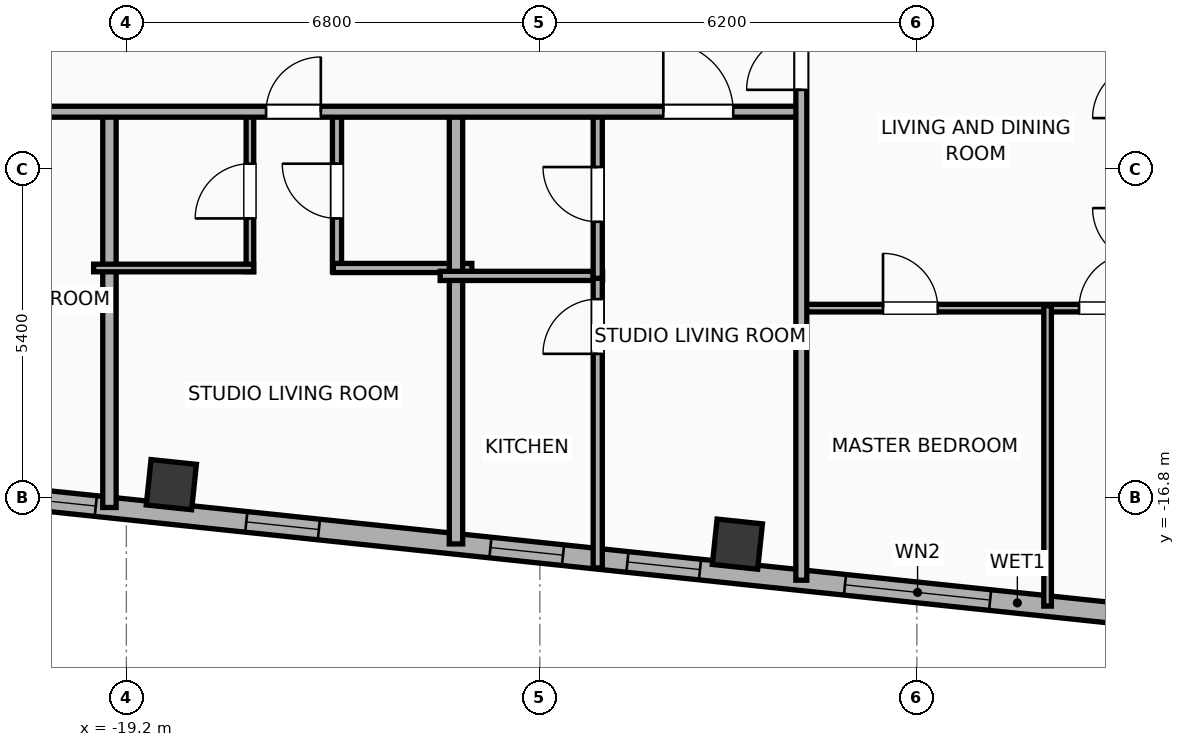
"""IFC4 building model, lengths in metres.
Left out: names, types, materials, properties, quantities, classifications, styles, units other than length and angle.
Written with IfcOpenShell. Run it as: python <this file> out.ifc"""

import sys

from ifc_helpers import new_model, si_unit, direction, frame, frame_2d, origin, origin_2d, place, context, subcontext, project, spatial, rectangle, hollow_rectangle, extrude, element, fill, save


model = new_model("IFC4")
c1 = context("Model", 3, precision=1e-05, world=origin(), true_north=direction((0.0, 1.0)))
c2 = subcontext(c1, "Body", "Model", "MODEL_VIEW")
j1 = project(units=[si_unit("LENGTHUNIT", "METRE"), si_unit("PLANEANGLEUNIT", "RADIAN")], contexts=[c1])
p1 = place(None, origin())
s1 = spatial("IfcSite", under=j1, at=p1, CompositionType="ELEMENT")
p2 = place(p1, origin())
s2 = spatial("IfcBuilding", under=s1, at=p2, CompositionType="ELEMENT")
p3 = place(p2, frame((0.0, 0.0, 263.9)))
s3 = spatial("IfcBuildingStorey", under=s2, at=p3, CompositionType="ELEMENT", Elevation=263.9)
for number, where, z_axis, x_axis in (
    (1, (-18.46, -16.583, 0.0), (0.0, 0.0, 1.0), (0.995, -0.105, 0.0)),
    (2, (-9.152, -17.561, 0.0), (0.0, 0.0, 1.0), (0.995, -0.105, 0.0)),
):
    element("IfcColumn", number, at=place(p3, frame(where, z_axis=z_axis, x_axis=x_axis)), inside=s3, PredefinedType="COLUMN", context=c2, shape_type="SweptSolid", body=[
        extrude(hollow_rectangle(XDim=0.75, YDim=0.75, WallThickness=0.025, at=origin_2d()), origin(), (0.0, 0.0, 1.0), 3.9),
    ])
p4 = place(p3, frame((18.708, -20.972, 0.0), z_axis=(0.0, 0.0, 1.0), x_axis=(-0.994521888554, 0.104528528102, 0.0)))
e3 = element("IfcWall", 3, at=p4, inside=s3, PredefinedType="ELEMENTEDWALL", context=c2, shape_type="SweptSolid", body=[
    extrude(rectangle(XDim=46.766, YDim=0.34, at=frame_2d((23.383, 0.0))), origin(), (0.0, 0.0, 1.0), 3.65),
])
p5 = place(p4, frame((23.833, 0.0, 0.75)))
e4 = element("IfcOpeningElement", 4, at=p5, cuts=e3, PredefinedType="OPENING", context=c2, shape_type="SweptSolid", body=[
    extrude(rectangle(XDim=2.4, YDim=2.1, at=frame_2d((1.2, 1.05))), frame((0.0, 0.18, 0.0), z_axis=(0.0, -1.0, 0.0), x_axis=(1.0, 0.0, 0.0)), (0.0, 0.0, 1.0), 0.36),
])
p6 = place(p4, frame((38.622, 0.0, 0.75)))
e5 = element("IfcOpeningElement", 5, at=p6, cuts=e3, PredefinedType="OPENING", context=c2, shape_type="SweptSolid", body=[
    extrude(rectangle(XDim=2.4, YDim=2.1, at=frame_2d((1.2, 1.05))), frame((0.0, 0.18, 0.0), z_axis=(0.0, -1.0, 0.0), x_axis=(1.0, 0.0, 0.0)), (0.0, 0.0, 1.0), 0.36),
])
p7 = place(p4, frame((44.402, 0.0, 0.75)))
e6 = element("IfcOpeningElement", 6, at=p7, cuts=e3, PredefinedType="OPENING", context=c2, shape_type="SweptSolid", body=[
    extrude(rectangle(XDim=1.2, YDim=2.05, at=frame_2d((0.6, 1.025))), frame((0.0, 0.18, 0.0), z_axis=(0.0, -1.0, 0.0), x_axis=(1.0, 0.0, 0.0)), (0.0, 0.0, 1.0), 0.36),
])
p8 = place(p4, frame((42.406, 0.0, 0.75)))
e7 = element("IfcOpeningElement", 7, at=p8, cuts=e3, PredefinedType="OPENING", context=c2, shape_type="SweptSolid", body=[
    extrude(rectangle(XDim=1.2, YDim=2.05, at=frame_2d((0.6, 1.025))), frame((0.0, 0.18, 0.0), z_axis=(0.0, -1.0, 0.0), x_axis=(1.0, 0.0, 0.0)), (0.0, 0.0, 1.0), 0.36),
])
p9 = place(p4, frame((34.933, 0.0, 0.75)))
e8 = element("IfcOpeningElement", 8, at=p9, cuts=e3, PredefinedType="OPENING", context=c2, shape_type="SweptSolid", body=[
    extrude(rectangle(XDim=1.2, YDim=2.05, at=frame_2d((0.6, 1.025))), frame((0.0, 0.18, 0.0), z_axis=(0.0, -1.0, 0.0), x_axis=(1.0, 0.0, 0.0)), (0.0, 0.0, 1.0), 0.36),
])
p10 = place(p4, frame((28.631, 0.0, 0.75)))
e9 = element("IfcOpeningElement", 9, at=p10, cuts=e3, PredefinedType="OPENING", context=c2, shape_type="SweptSolid", body=[
    extrude(rectangle(XDim=1.2, YDim=2.05, at=frame_2d((0.6, 1.025))), frame((0.0, 0.18, 0.0), z_axis=(0.0, -1.0, 0.0), x_axis=(1.0, 0.0, 0.0)), (0.0, 0.0, 1.0), 0.36),
])
p11 = place(p4, frame((30.896, 0.0, 0.75)))
e10 = element("IfcOpeningElement", 10, at=p11, cuts=e3, PredefinedType="OPENING", context=c2, shape_type="SweptSolid", body=[
    extrude(rectangle(XDim=1.2, YDim=2.05, at=frame_2d((0.6, 1.025))), frame((0.0, 0.18, 0.0), z_axis=(0.0, -1.0, 0.0), x_axis=(1.0, 0.0, 0.0)), (0.0, 0.0, 1.0), 0.36),
])
p12 = place(p4, frame((7.501, 0.0, 0.75)))
e11 = element("IfcOpeningElement", 11, at=p12, cuts=e3, PredefinedType="OPENING", context=c2, shape_type="SweptSolid", body=[
    extrude(rectangle(XDim=1.2, YDim=2.05, at=frame_2d((0.6, 1.025))), frame((0.0, 0.18, 0.0), z_axis=(0.0, -1.0, 0.0), x_axis=(1.0, 0.0, 0.0)), (0.0, 0.0, 1.0), 0.36),
])
p13 = place(p4, frame((4.159, 0.0, 0.75)))
e12 = element("IfcOpeningElement", 12, at=p13, cuts=e3, PredefinedType="OPENING", context=c2, shape_type="SweptSolid", body=[
    extrude(rectangle(XDim=1.2, YDim=2.05, at=frame_2d((0.6, 1.025))), frame((0.0, 0.18, 0.0), z_axis=(0.0, -1.0, 0.0), x_axis=(1.0, 0.0, 0.0)), (0.0, 0.0, 1.0), 0.36),
])
p14 = place(p4, frame((1.369, 0.0, 0.75)))
e13 = element("IfcOpeningElement", 13, at=p14, cuts=e3, PredefinedType="OPENING", context=c2, shape_type="SweptSolid", body=[
    extrude(rectangle(XDim=1.2, YDim=2.05, at=frame_2d((0.6, 1.025))), frame((0.0, 0.18, 0.0), z_axis=(0.0, -1.0, 0.0), x_axis=(1.0, 0.0, 0.0)), (0.0, 0.0, 1.0), 0.36),
])
p15 = place(p4, frame((20.254, 0.0, 0.75)))
e14 = element("IfcOpeningElement", 14, at=p15, cuts=e3, PredefinedType="OPENING", context=c2, shape_type="SweptSolid", body=[
    extrude(rectangle(XDim=1.2, YDim=2.05, at=frame_2d((0.6, 1.025))), frame((0.0, 0.18, 0.0), z_axis=(0.0, -1.0, 0.0), x_axis=(1.0, 0.0, 0.0)), (0.0, 0.0, 1.0), 0.36),
])
p16 = place(p4, frame((16.172, 0.0, 0.75)))
e15 = element("IfcOpeningElement", 15, at=p16, cuts=e3, PredefinedType="OPENING", context=c2, shape_type="SweptSolid", body=[
    extrude(rectangle(XDim=1.2, YDim=2.05, at=frame_2d((0.6, 1.025))), frame((0.0, 0.18, 0.0), z_axis=(0.0, -1.0, 0.0), x_axis=(1.0, 0.0, 0.0)), (0.0, 0.0, 1.0), 0.36),
])
p17 = place(p4, frame((12.11, 0.0, 0.75)))
e16 = element("IfcOpeningElement", 16, at=p17, cuts=e3, PredefinedType="OPENING", context=c2, shape_type="SweptSolid", body=[
    extrude(rectangle(XDim=1.2, YDim=2.05, at=frame_2d((0.6, 1.025))), frame((0.0, 0.18, 0.0), z_axis=(0.0, -1.0, 0.0), x_axis=(1.0, 0.0, 0.0)), (0.0, 0.0, 1.0), 0.36),
])
p18 = place(p3, frame((-19.478, -16.959, 0.0), z_axis=(0.0, 0.0, 1.0), x_axis=(0.0, 1.0, 0.0)))
e17 = element("IfcWall", 17, at=p18, inside=s3, PredefinedType="PARTITIONING", context=c2, shape_type="SweptSolid", body=[
    extrude(rectangle(XDim=6.589, YDim=0.22, at=frame_2d((3.294, 0.0))), origin(), (0.0, 0.0, 1.0), 3.65),
])
p19 = place(p3, frame((-17.168, -13.08, 0.0), z_axis=(0.0, 0.0, 1.0), x_axis=(0.0, 1.0, 0.0)))
e18 = element("IfcWall", 18, at=p19, inside=s3, PredefinedType="PARTITIONING", context=c2, shape_type="SweptSolid", body=[
    extrude(rectangle(XDim=2.65, YDim=0.125, at=frame_2d((1.325, 0.0))), origin(), (0.0, 0.0, 1.0), 3.65),
])
p20 = place(p19, frame((0.875, 0.0, 0.0)))
e19 = element("IfcOpeningElement", 19, at=p20, cuts=e18, PredefinedType="OPENING", context=c2, shape_type="SweptSolid", body=[
    extrude(rectangle(XDim=0.9, YDim=2.05, at=frame_2d((0.45, 1.025))), frame((0.0, 0.073, 0.0), z_axis=(0.0, -1.0, 0.0), x_axis=(1.0, 0.0, 0.0)), (0.0, 0.0, 1.0), 0.145),
])
p21 = place(p3, frame((-15.736, -13.08, 0.0), z_axis=(0.0, 0.0, 1.0), x_axis=(0.0, 1.0, 0.0)))
e20 = element("IfcWall", 20, at=p21, inside=s3, PredefinedType="PLUMBINGWALL", context=c2, shape_type="SweptSolid", body=[
    extrude(rectangle(XDim=2.65, YDim=0.15, at=frame_2d((1.325, 0.0))), origin(), (0.0, 0.0, 1.0), 3.65),
])
p22 = place(p21, frame((0.875, 0.0, 0.0)))
e21 = element("IfcOpeningElement", 21, at=p22, cuts=e20, PredefinedType="OPENING", context=c2, shape_type="SweptSolid", body=[
    extrude(rectangle(XDim=0.9, YDim=2.05, at=frame_2d((0.45, 1.025))), frame((0.0, 0.085, 0.0), z_axis=(0.0, -1.0, 0.0), x_axis=(1.0, 0.0, 0.0)), (0.0, 0.0, 1.0), 0.17),
])
p23 = place(p3, frame((-19.738, -13.02, 0.0), z_axis=(0.0, 0.0, 1.0), x_axis=(1.0, 0.0, 0.0)))
e22 = element("IfcWall", 22, at=p23, inside=s3, PredefinedType="PARTITIONING", context=c2, shape_type="SweptSolid", body=[
    extrude(rectangle(XDim=2.63, YDim=0.125, at=frame_2d((1.315, 0.0))), origin(), (0.0, 0.0, 1.0), 3.65),
])
p24 = place(p3, frame((-15.796, -13.02, 0.0), z_axis=(0.0, 0.0, 1.0), x_axis=(1.0, 0.0, 0.0)))
e23 = element("IfcWall", 23, at=p24, inside=s3, PredefinedType="PLUMBINGWALL", context=c2, shape_type="SweptSolid", body=[
    extrude(rectangle(XDim=2.277, YDim=0.15, at=frame_2d((1.138, 0.0))), origin(), (0.0, 0.0, 1.0), 3.65),
])
p25 = place(p3, frame((-13.779, -17.558, 0.0), z_axis=(0.0, 0.0, 1.0), x_axis=(0.0, 1.0, 0.0)))
e24 = element("IfcWall", 24, at=p25, inside=s3, PredefinedType="PARTITIONING", context=c2, shape_type="SweptSolid", body=[
    extrude(rectangle(XDim=7.188, YDim=0.22, at=frame_2d((3.594, 0.0))), origin(), (0.0, 0.0, 1.0), 3.65),
])
p26 = place(p3, frame((-14.039, -13.15, 0.0), z_axis=(0.0, 0.0, 1.0), x_axis=(1.0, 0.0, 0.0)))
e25 = element("IfcWall", 25, at=p26, inside=s3, PredefinedType="PLUMBINGWALL", context=c2, shape_type="SweptSolid", body=[
    extrude(rectangle(XDim=2.671, YDim=0.15, at=frame_2d((1.335, 0.0))), origin(), (0.0, 0.0, 1.0), 3.65),
])
p27 = place(p3, frame((-11.448, -17.954, 0.0), z_axis=(0.0, 0.0, 1.0), x_axis=(0.0, 1.0, 0.0)))
e26 = element("IfcWall", 26, at=p27, inside=s3, PredefinedType="PLUMBINGWALL", context=c2, shape_type="SweptSolid", body=[
    extrude(rectangle(XDim=4.844, YDim=0.15, at=frame_2d((2.422, 0.0))), origin(), (0.0, 0.0, 1.0), 3.65),
])
p28 = place(p27, frame((3.522, 0.0, 0.0)))
e27 = element("IfcOpeningElement", 27, at=p28, cuts=e26, PredefinedType="OPENING", context=c2, shape_type="SweptSolid", body=[
    extrude(rectangle(XDim=0.9, YDim=2.05, at=frame_2d((0.45, 1.025))), frame((0.0, 0.085, 0.0), z_axis=(0.0, -1.0, 0.0), x_axis=(1.0, 0.0, 0.0)), (0.0, 0.0, 1.0), 0.17),
])
p29 = place(p3, frame((-11.448, -13.19, 0.0), z_axis=(0.0, 0.0, 1.0), x_axis=(0.0, 1.0, 0.0)))
e28 = element("IfcWall", 28, at=p29, inside=s3, PredefinedType="PLUMBINGWALL", context=c2, shape_type="SweptSolid", body=[
    extrude(rectangle(XDim=2.76, YDim=0.15, at=frame_2d((1.38, 0.0))), origin(), (0.0, 0.0, 1.0), 3.09),
])
p30 = place(p29, frame((0.93, 0.0, 0.0)))
e29 = element("IfcOpeningElement", 29, at=p30, cuts=e28, PredefinedType="OPENING", context=c2, shape_type="SweptSolid", body=[
    extrude(rectangle(XDim=0.9, YDim=2.05, at=frame_2d((0.45, 1.025))), frame((0.0, 0.085, 0.0), z_axis=(0.0, -1.0, 0.0), x_axis=(1.0, 0.0, 0.0)), (0.0, 0.0, 1.0), 0.17),
])
p31 = place(p3, frame((-30.676, -10.45, 0.0), z_axis=(0.0, 0.0, 1.0), x_axis=(1.0, 0.0, 0.0)))
e30 = element("IfcWall", 30, at=p31, inside=s3, PredefinedType="PARTITIONING", context=c2, shape_type="SweptSolid", body=[
    extrude(rectangle(XDim=22.596, YDim=0.18, at=frame_2d((11.298, 0.0))), origin(), (0.0, 0.0, 1.0), 3.65),
])
p32 = place(p31, frame((2.336, 0.0, 0.0)))
e31 = element("IfcOpeningElement", 31, at=p32, cuts=e30, PredefinedType="OPENING", context=c2, shape_type="SweptSolid", body=[
    extrude(rectangle(XDim=0.9, YDim=2.05, at=frame_2d((0.45, 1.025))), frame((0.0, 0.1, 0.0), z_axis=(0.0, -1.0, 0.0), x_axis=(1.0, 0.0, 0.0)), (0.0, 0.0, 1.0), 0.2),
])
p33 = place(p31, frame((8.861, 0.0, 0.0)))
e32 = element("IfcOpeningElement", 32, at=p33, cuts=e30, PredefinedType="OPENING", context=c2, shape_type="SweptSolid", body=[
    extrude(rectangle(XDim=1.15, YDim=2.05, at=frame_2d((0.575, 1.025))), frame((0.0, 0.1, 0.0), z_axis=(0.0, -1.0, 0.0), x_axis=(1.0, 0.0, 0.0)), (0.0, 0.0, 1.0), 0.2),
])
p34 = place(p31, frame((13.774, 0.0, 0.0)))
e33 = element("IfcOpeningElement", 33, at=p34, cuts=e30, PredefinedType="OPENING", context=c2, shape_type="SweptSolid", body=[
    extrude(rectangle(XDim=0.9, YDim=2.05, at=frame_2d((0.45, 1.025))), frame((0.0, 0.1, 0.0), z_axis=(0.0, -1.0, 0.0), x_axis=(1.0, 0.0, 0.0)), (0.0, 0.0, 1.0), 0.2),
])
p35 = place(p31, frame((20.306, 0.0, 0.0)))
e34 = element("IfcOpeningElement", 34, at=p35, cuts=e30, PredefinedType="OPENING", context=c2, shape_type="SweptSolid", body=[
    extrude(rectangle(XDim=1.15, YDim=2.05, at=frame_2d((0.575, 1.025))), frame((0.0, 0.1, 0.0), z_axis=(0.0, -1.0, 0.0), x_axis=(1.0, 0.0, 0.0)), (0.0, 0.0, 1.0), 0.2),
])
p36 = place(p3, frame((-8.08, -13.68, 0.0), z_axis=(0.0, 0.0, 1.0), x_axis=(1.0, 0.0, 0.0)))
e35 = element("IfcWall", 35, at=p36, inside=s3, PredefinedType="PARTITIONING", context=c2, shape_type="SweptSolid", body=[
    extrude(rectangle(XDim=8.06, YDim=0.125, at=frame_2d((4.03, 0.0))), origin(), (0.0, 0.0, 1.0), 3.65),
])
p37 = place(p36, frame((1.323, 0.0, 0.0)))
e36 = element("IfcOpeningElement", 36, at=p37, cuts=e35, PredefinedType="OPENING", context=c2, shape_type="SweptSolid", body=[
    extrude(rectangle(XDim=0.9, YDim=2.05, at=frame_2d((0.45, 1.025))), frame((0.0, 0.073, 0.0), z_axis=(0.0, -1.0, 0.0), x_axis=(1.0, 0.0, 0.0)), (0.0, 0.0, 1.0), 0.145),
])
p38 = place(p36, frame((4.547, 0.0, 0.0)))
e37 = element("IfcOpeningElement", 37, at=p38, cuts=e35, PredefinedType="OPENING", context=c2, shape_type="SweptSolid", body=[
    extrude(rectangle(XDim=0.9, YDim=2.05, at=frame_2d((0.45, 1.025))), frame((0.0, 0.073, 0.0), z_axis=(0.0, -1.0, 0.0), x_axis=(1.0, 0.0, 0.0)), (0.0, 0.0, 1.0), 0.145),
])
p39 = place(p3, frame((-4.05, -18.58, 0.0), z_axis=(0.0, 0.0, 1.0), x_axis=(0.0, 1.0, 0.0)))
e38 = element("IfcWall", 38, at=p39, inside=s3, PredefinedType="PARTITIONING", context=c2, shape_type="SweptSolid", body=[
    extrude(rectangle(XDim=4.94, YDim=0.125, at=frame_2d((2.47, 0.0))), origin(), (0.0, 0.0, 1.0), 3.65),
])
p40 = place(p3, frame((-8.1, -18.155, 0.0), z_axis=(0.0, 0.0, 1.0), x_axis=(0.0, 1.0, 0.0)))
e39 = element("IfcWall", 39, at=p40, inside=s3, PredefinedType="PARTITIONING", context=c2, shape_type="SweptSolid", body=[
    extrude(rectangle(XDim=9.314, YDim=0.18, at=frame_2d((4.657, 0.0))), origin(), (0.0, 0.0, 1.0), 3.65),
])
p41 = place(p40, frame((8.064, 0.0, 0.0)))
e40 = element("IfcOpeningElement", 40, at=p41, cuts=e39, PredefinedType="OPENING", context=c2, shape_type="SweptSolid", body=[
    extrude(rectangle(XDim=0.9, YDim=2.05, at=frame_2d((0.45, 1.025))), frame((0.0, 0.1, 0.0), z_axis=(0.0, -1.0, 0.0), x_axis=(1.0, 0.0, 0.0)), (0.0, 0.0, 1.0), 0.2),
])
p42 = place(p5, origin())
e41 = element("IfcWindow", 41, at=p42, inside=s3, PartitioningType="SINGLE_PANEL", PredefinedType="WINDOW", context=c2, shape_type="SweptSolid", body=[
    extrude(rectangle(XDim=2.4, YDim=2.1, at=frame_2d((1.2, 1.05))), frame((0.0, 0.03, 0.0), z_axis=(0.0, -1.0, 0.0), x_axis=(1.0, 0.0, 0.0)), (0.0, 0.0, 1.0), 0.06),
])
fill(e4, e41)
p43 = place(p6, origin())
e42 = element("IfcWindow", 42, at=p43, inside=s3, PartitioningType="SINGLE_PANEL", PredefinedType="WINDOW", context=c2, shape_type="SweptSolid", body=[
    extrude(rectangle(XDim=2.4, YDim=2.1, at=frame_2d((1.2, 1.05))), frame((0.0, 0.03, 0.0), z_axis=(0.0, -1.0, 0.0), x_axis=(1.0, 0.0, 0.0)), (0.0, 0.0, 1.0), 0.06),
])
fill(e5, e42)
p44 = place(p9, origin())
e43 = element("IfcWindow", 43, at=p44, inside=s3, PartitioningType="SINGLE_PANEL", PredefinedType="WINDOW", context=c2, shape_type="SweptSolid", body=[
    extrude(rectangle(XDim=1.2, YDim=2.05, at=frame_2d((0.6, 1.025))), frame((0.0, 0.03, 0.0), z_axis=(0.0, -1.0, 0.0), x_axis=(1.0, 0.0, 0.0)), (0.0, 0.0, 1.0), 0.06),
])
fill(e8, e43)
p45 = place(p10, origin())
e44 = element("IfcWindow", 44, at=p45, inside=s3, PartitioningType="SINGLE_PANEL", PredefinedType="WINDOW", context=c2, shape_type="SweptSolid", body=[
    extrude(rectangle(XDim=1.2, YDim=2.05, at=frame_2d((0.6, 1.025))), frame((0.0, 0.03, 0.0), z_axis=(0.0, -1.0, 0.0), x_axis=(1.0, 0.0, 0.0)), (0.0, 0.0, 1.0), 0.06),
])
fill(e9, e44)
p46 = place(p11, origin())
e45 = element("IfcWindow", 45, at=p46, inside=s3, PartitioningType="SINGLE_PANEL", PredefinedType="WINDOW", context=c2, shape_type="SweptSolid", body=[
    extrude(rectangle(XDim=1.2, YDim=2.05, at=frame_2d((0.6, 1.025))), frame((0.0, 0.03, 0.0), z_axis=(0.0, -1.0, 0.0), x_axis=(1.0, 0.0, 0.0)), (0.0, 0.0, 1.0), 0.06),
])
fill(e10, e45)
p47 = place(p20, origin())
e46 = element("IfcDoor", 46, at=p47, inside=s3, OperationType="SINGLE_SWING_LEFT", PredefinedType="DOOR", context=c2, shape_type="SweptSolid", body=[
    extrude(rectangle(XDim=0.9, YDim=2.05, at=frame_2d((0.45, 1.025))), frame((0.0, 0.025, 0.0), z_axis=(0.0, -1.0, 0.0), x_axis=(1.0, 0.0, 0.0)), (0.0, 0.0, 1.0), 0.05),
])
fill(e19, e46)
p48 = place(p22, origin())
e47 = element("IfcDoor", 47, at=p48, inside=s3, OperationType="SINGLE_SWING_RIGHT", PredefinedType="DOOR", context=c2, shape_type="SweptSolid", body=[
    extrude(rectangle(XDim=0.9, YDim=2.05, at=frame_2d((0.45, 1.025))), frame((0.0, 0.025, 0.0), z_axis=(0.0, -1.0, 0.0), x_axis=(1.0, 0.0, 0.0)), (0.0, 0.0, 1.0), 0.05),
])
fill(e21, e47)
p49 = place(p28, origin())
e48 = element("IfcDoor", 48, at=p49, inside=s3, OperationType="SINGLE_SWING_LEFT", PredefinedType="DOOR", context=c2, shape_type="SweptSolid", body=[
    extrude(rectangle(XDim=0.9, YDim=2.05, at=frame_2d((0.45, 1.025))), frame((0.0, 0.025, 0.0), z_axis=(0.0, -1.0, 0.0), x_axis=(1.0, 0.0, 0.0)), (0.0, 0.0, 1.0), 0.05),
])
fill(e27, e48)
p50 = place(p30, origin())
e49 = element("IfcDoor", 49, at=p50, inside=s3, OperationType="SINGLE_SWING_RIGHT", PredefinedType="DOOR", context=c2, shape_type="SweptSolid", body=[
    extrude(rectangle(XDim=0.9, YDim=2.05, at=frame_2d((0.45, 1.025))), frame((0.0, 0.025, 0.0), z_axis=(0.0, -1.0, 0.0), x_axis=(1.0, 0.0, 0.0)), (0.0, 0.0, 1.0), 0.05),
])
fill(e29, e49)
p51 = place(p34, origin())
e50 = element("IfcDoor", 50, at=p51, inside=s3, OperationType="SINGLE_SWING_RIGHT", PredefinedType="DOOR", context=c2, shape_type="SweptSolid", body=[
    extrude(rectangle(XDim=0.9, YDim=2.05, at=frame_2d((0.45, 1.025))), frame((0.0, 0.025, 0.0), z_axis=(0.0, -1.0, 0.0), x_axis=(1.0, 0.0, 0.0)), (0.0, 0.0, 1.0), 0.05),
])
fill(e33, e50)
p52 = place(p35, origin())
e51 = element("IfcDoor", 51, at=p52, inside=s3, OperationType="SINGLE_SWING_LEFT", PredefinedType="DOOR", context=c2, shape_type="SweptSolid", body=[
    extrude(rectangle(XDim=1.15, YDim=2.05, at=frame_2d((0.575, 1.025))), frame((0.0, 0.025, 0.0), z_axis=(0.0, -1.0, 0.0), x_axis=(1.0, 0.0, 0.0)), (0.0, 0.0, 1.0), 0.05),
])
fill(e34, e51)
p53 = place(p37, origin())
e52 = element("IfcDoor", 52, at=p53, inside=s3, OperationType="SINGLE_SWING_LEFT", PredefinedType="DOOR", context=c2, shape_type="SweptSolid", body=[
    extrude(rectangle(XDim=0.9, YDim=2.05, at=frame_2d((0.45, 1.025))), frame((0.0, 0.025, 0.0), z_axis=(0.0, -1.0, 0.0), x_axis=(1.0, 0.0, 0.0)), (0.0, 0.0, 1.0), 0.05),
])
fill(e36, e52)
p54 = place(p38, origin())
e53 = element("IfcDoor", 53, at=p54, inside=s3, OperationType="SINGLE_SWING_RIGHT", PredefinedType="DOOR", context=c2, shape_type="SweptSolid", body=[
    extrude(rectangle(XDim=0.9, YDim=2.05, at=frame_2d((0.45, 1.025))), frame((0.0, 0.025, 0.0), z_axis=(0.0, -1.0, 0.0), x_axis=(1.0, 0.0, 0.0)), (0.0, 0.0, 1.0), 0.05),
])
fill(e37, e53)
p55 = place(p41, origin())
e54 = element("IfcDoor", 54, at=p55, inside=s3, OperationType="SINGLE_SWING_LEFT", PredefinedType="DOOR", context=c2, shape_type="SweptSolid", body=[
    extrude(rectangle(XDim=0.9, YDim=2.05, at=frame_2d((0.45, 1.025))), frame((0.0, 0.025, 0.0), z_axis=(0.0, -1.0, 0.0), x_axis=(1.0, 0.0, 0.0)), (0.0, 0.0, 1.0), 0.05),
])
fill(e40, e54)
save(model, sys.argv[1])
